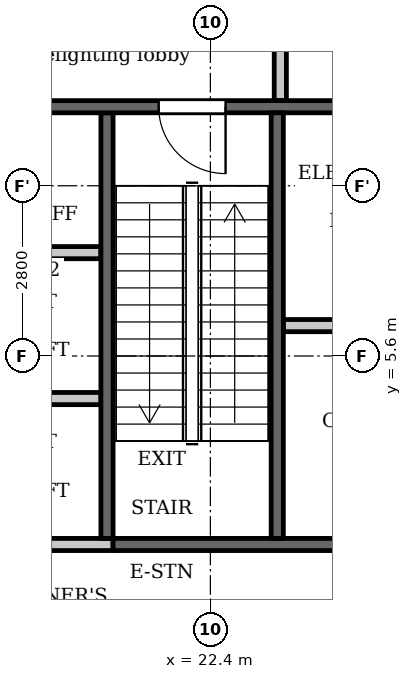
"""IFC4 building model, lengths in metres.
Left out: names, types, materials, properties, quantities, classifications, styles, units other than length and angle.
Written with IfcOpenShell. Run it as: python <this file> out.ifc"""

import sys

from ifc_helpers import new_model, si_unit, direction, frame, frame_2d, origin, place, context, subcontext, project, spatial, rectangle, extrude, element, fill, save


model = new_model("IFC4")
c1 = context("Model", 3, precision=1e-05, world=origin(), true_north=direction((0.0, 1.0)))
c2 = subcontext(c1, "Body", "Model", "MODEL_VIEW")
j1 = project(units=[si_unit("LENGTHUNIT", "METRE"), si_unit("PLANEANGLEUNIT", "RADIAN")], contexts=[c1])
p1 = place(None, origin())
s1 = spatial("IfcSite", under=j1, at=p1, CompositionType="ELEMENT")
p2 = place(p1, origin())
s2 = spatial("IfcBuilding", under=s1, at=p2, CompositionType="ELEMENT")
p3 = place(p2, frame((0.0, 0.0, 183.5)))
s3 = spatial("IfcBuildingStorey", under=s2, at=p3, CompositionType="ELEMENT", Elevation=183.5)
p4 = place(p3, frame((20.7, 2.6, 0.0), z_axis=(0.0, 0.0, 1.0), x_axis=(0.0, 1.0, 0.0)))
e1 = element("IfcWall", 1, at=p4, inside=s3, PredefinedType="SHEAR", context=c2, shape_type="SweptSolid", body=[
    extrude(rectangle(XDim=7.0, YDim=0.2, at=frame_2d((3.5, 0.0))), origin(), (0.0, 0.0, 1.0), 4.6),
])
p5 = place(p3, frame((20.8, 2.5, 0.0), z_axis=(0.0, 0.0, 1.0), x_axis=(1.0, 0.0, 0.0)))
e2 = element("IfcWall", 2, at=p5, inside=s3, PredefinedType="SHEAR", context=c2, shape_type="SweptSolid", body=[
    extrude(rectangle(XDim=5.45, YDim=0.2, at=frame_2d((2.725, 0.0))), origin(), (0.0, 0.0, 1.0), 4.6),
])
p6 = place(p5, frame((3.675, 0.0, 0.0)))
e3 = element("IfcOpeningElement", 3, at=p6, cuts=e2, PredefinedType="OPENING", context=c2, shape_type="SweptSolid", body=[
    extrude(rectangle(XDim=0.9, YDim=2.1, at=frame_2d((0.45, 1.05))), frame((0.0, 0.11, 0.0), z_axis=(0.0, -1.0, 0.0), x_axis=(1.0, 0.0, 0.0)), (0.0, 0.0, 1.0), 0.22),
])
p7 = place(p3, frame((23.55, 9.8, 0.0), z_axis=(0.0, 0.0, 1.0), x_axis=(0.0, 1.0, 0.0)))
e4 = element("IfcWall", 4, at=p7, inside=s3, PredefinedType="PARTITIONING", context=c2, shape_type="SweptSolid", body=[
    extrude(rectangle(XDim=2.65, YDim=0.2, at=frame_2d((1.325, 0.0))), origin(), (0.0, 0.0, 1.0), 4.6),
])
p8 = place(p7, frame((0.875, 0.0, 0.0)))
e5 = element("IfcOpeningElement", 5, at=p8, cuts=e4, PredefinedType="OPENING", context=c2, shape_type="SweptSolid", body=[
    extrude(rectangle(XDim=0.9, YDim=2.1, at=frame_2d((0.45, 1.05))), frame((0.0, 0.11, 0.0), z_axis=(0.0, -1.0, 0.0), x_axis=(1.0, 0.0, 0.0)), (0.0, 0.0, 1.0), 0.22),
])
p9 = place(p3, frame((23.6, 6.1, 0.0), z_axis=(0.0, 0.0, 1.0), x_axis=(1.0, 0.0, 0.0)))
e6 = element("IfcWall", 6, at=p9, inside=s3, PredefinedType="PARTITIONING", context=c2, shape_type="SweptSolid", body=[
    extrude(rectangle(XDim=2.65, YDim=0.2, at=frame_2d((1.325, 0.0))), origin(), (0.0, 0.0, 1.0), 4.6),
])
p10 = place(p9, frame((0.875, 0.0, 0.0)))
e7 = element("IfcOpeningElement", 7, at=p10, cuts=e6, PredefinedType="OPENING", context=c2, shape_type="SweptSolid", body=[
    extrude(rectangle(XDim=0.9, YDim=2.1, at=frame_2d((0.45, 1.05))), frame((0.0, 0.11, 0.0), z_axis=(0.0, -1.0, 0.0), x_axis=(1.0, 0.0, 0.0)), (0.0, 0.0, 1.0), 0.22),
])
p11 = place(p3, frame((17.8, 2.5, 0.0), z_axis=(0.0, 0.0, 1.0), x_axis=(1.0, 0.0, 0.0)))
e8 = element("IfcWall", 8, at=p11, inside=s3, PredefinedType="PARTITIONING", context=c2, shape_type="SweptSolid", body=[
    extrude(rectangle(XDim=3.0, YDim=0.2, at=frame_2d((1.5, 0.0))), origin(), (0.0, 0.0, 1.0), 4.6),
])
for number, where, z_axis, x_axis in (
    (9, (17.8, 4.9, 0.0), (0.0, 0.0, 1.0), (1.0, 0.0, 0.0)),
    (10, (17.8, 7.3, 0.0), (0.0, 0.0, 1.0), (1.0, 0.0, 0.0)),
):
    element("IfcWall", number, at=place(p3, frame(where, z_axis=z_axis, x_axis=x_axis)), inside=s3, PredefinedType="PARTITIONING", context=c2, shape_type="SweptSolid", body=[
        extrude(rectangle(XDim=2.8, YDim=0.2, at=frame_2d((1.4, 0.0))), origin(), (0.0, 0.0, 1.0), 4.6),
    ])
p12 = place(p3, frame((17.8, 9.7, 0.0), z_axis=(0.0, 0.0, 1.0), x_axis=(1.0, 0.0, 0.0)))
e11 = element("IfcWall", 11, at=p12, inside=s3, PredefinedType="SHEAR", context=c2, shape_type="SweptSolid", body=[
    extrude(rectangle(XDim=8.45, YDim=0.2, at=frame_2d((4.225, 0.0))), origin(), (0.0, 0.0, 1.0), 4.6),
])
p13 = place(p12, frame((0.85, 0.0, 0.0)))
e12 = element("IfcOpeningElement", 12, at=p13, cuts=e11, PredefinedType="OPENING", context=c2, shape_type="SweptSolid", body=[
    extrude(rectangle(XDim=1.1, YDim=2.1, at=frame_2d((0.55, 1.05))), frame((0.0, 0.11, 0.0), z_axis=(0.0, -1.0, 0.0), x_axis=(1.0, 0.0, 0.0)), (0.0, 0.0, 1.0), 0.22),
])
p14 = place(p12, frame((3.75, 0.0, 0.0)))
e13 = element("IfcOpeningElement", 13, at=p14, cuts=e11, PredefinedType="OPENING", context=c2, shape_type="SweptSolid", body=[
    extrude(rectangle(XDim=1.1, YDim=2.1, at=frame_2d((0.55, 1.05))), frame((0.0, 0.11, 0.0), z_axis=(0.0, -1.0, 0.0), x_axis=(1.0, 0.0, 0.0)), (0.0, 0.0, 1.0), 0.22),
])
p15 = place(p3, frame((23.5, 2.6, 0.0), z_axis=(0.0, 0.0, 1.0), x_axis=(0.0, 1.0, 0.0)))
e14 = element("IfcWall", 14, at=p15, inside=s3, PredefinedType="SHEAR", context=c2, shape_type="SweptSolid", body=[
    extrude(rectangle(XDim=7.0, YDim=0.2, at=frame_2d((3.5, 0.0))), origin(), (0.0, 0.0, 1.0), 4.6),
])
p16 = place(p14, origin())
e15 = element("IfcDoor", 15, at=p16, inside=s3, OperationType="SINGLE_SWING_RIGHT", PredefinedType="DOOR", context=c2, shape_type="SweptSolid", body=[
    extrude(rectangle(XDim=1.1, YDim=2.1, at=frame_2d((0.55, 1.05))), frame((0.0, 0.025, 0.0), z_axis=(0.0, -1.0, 0.0), x_axis=(1.0, 0.0, 0.0)), (0.0, 0.0, 1.0), 0.05),
])
fill(e13, e15)
save(model, sys.argv[1])
